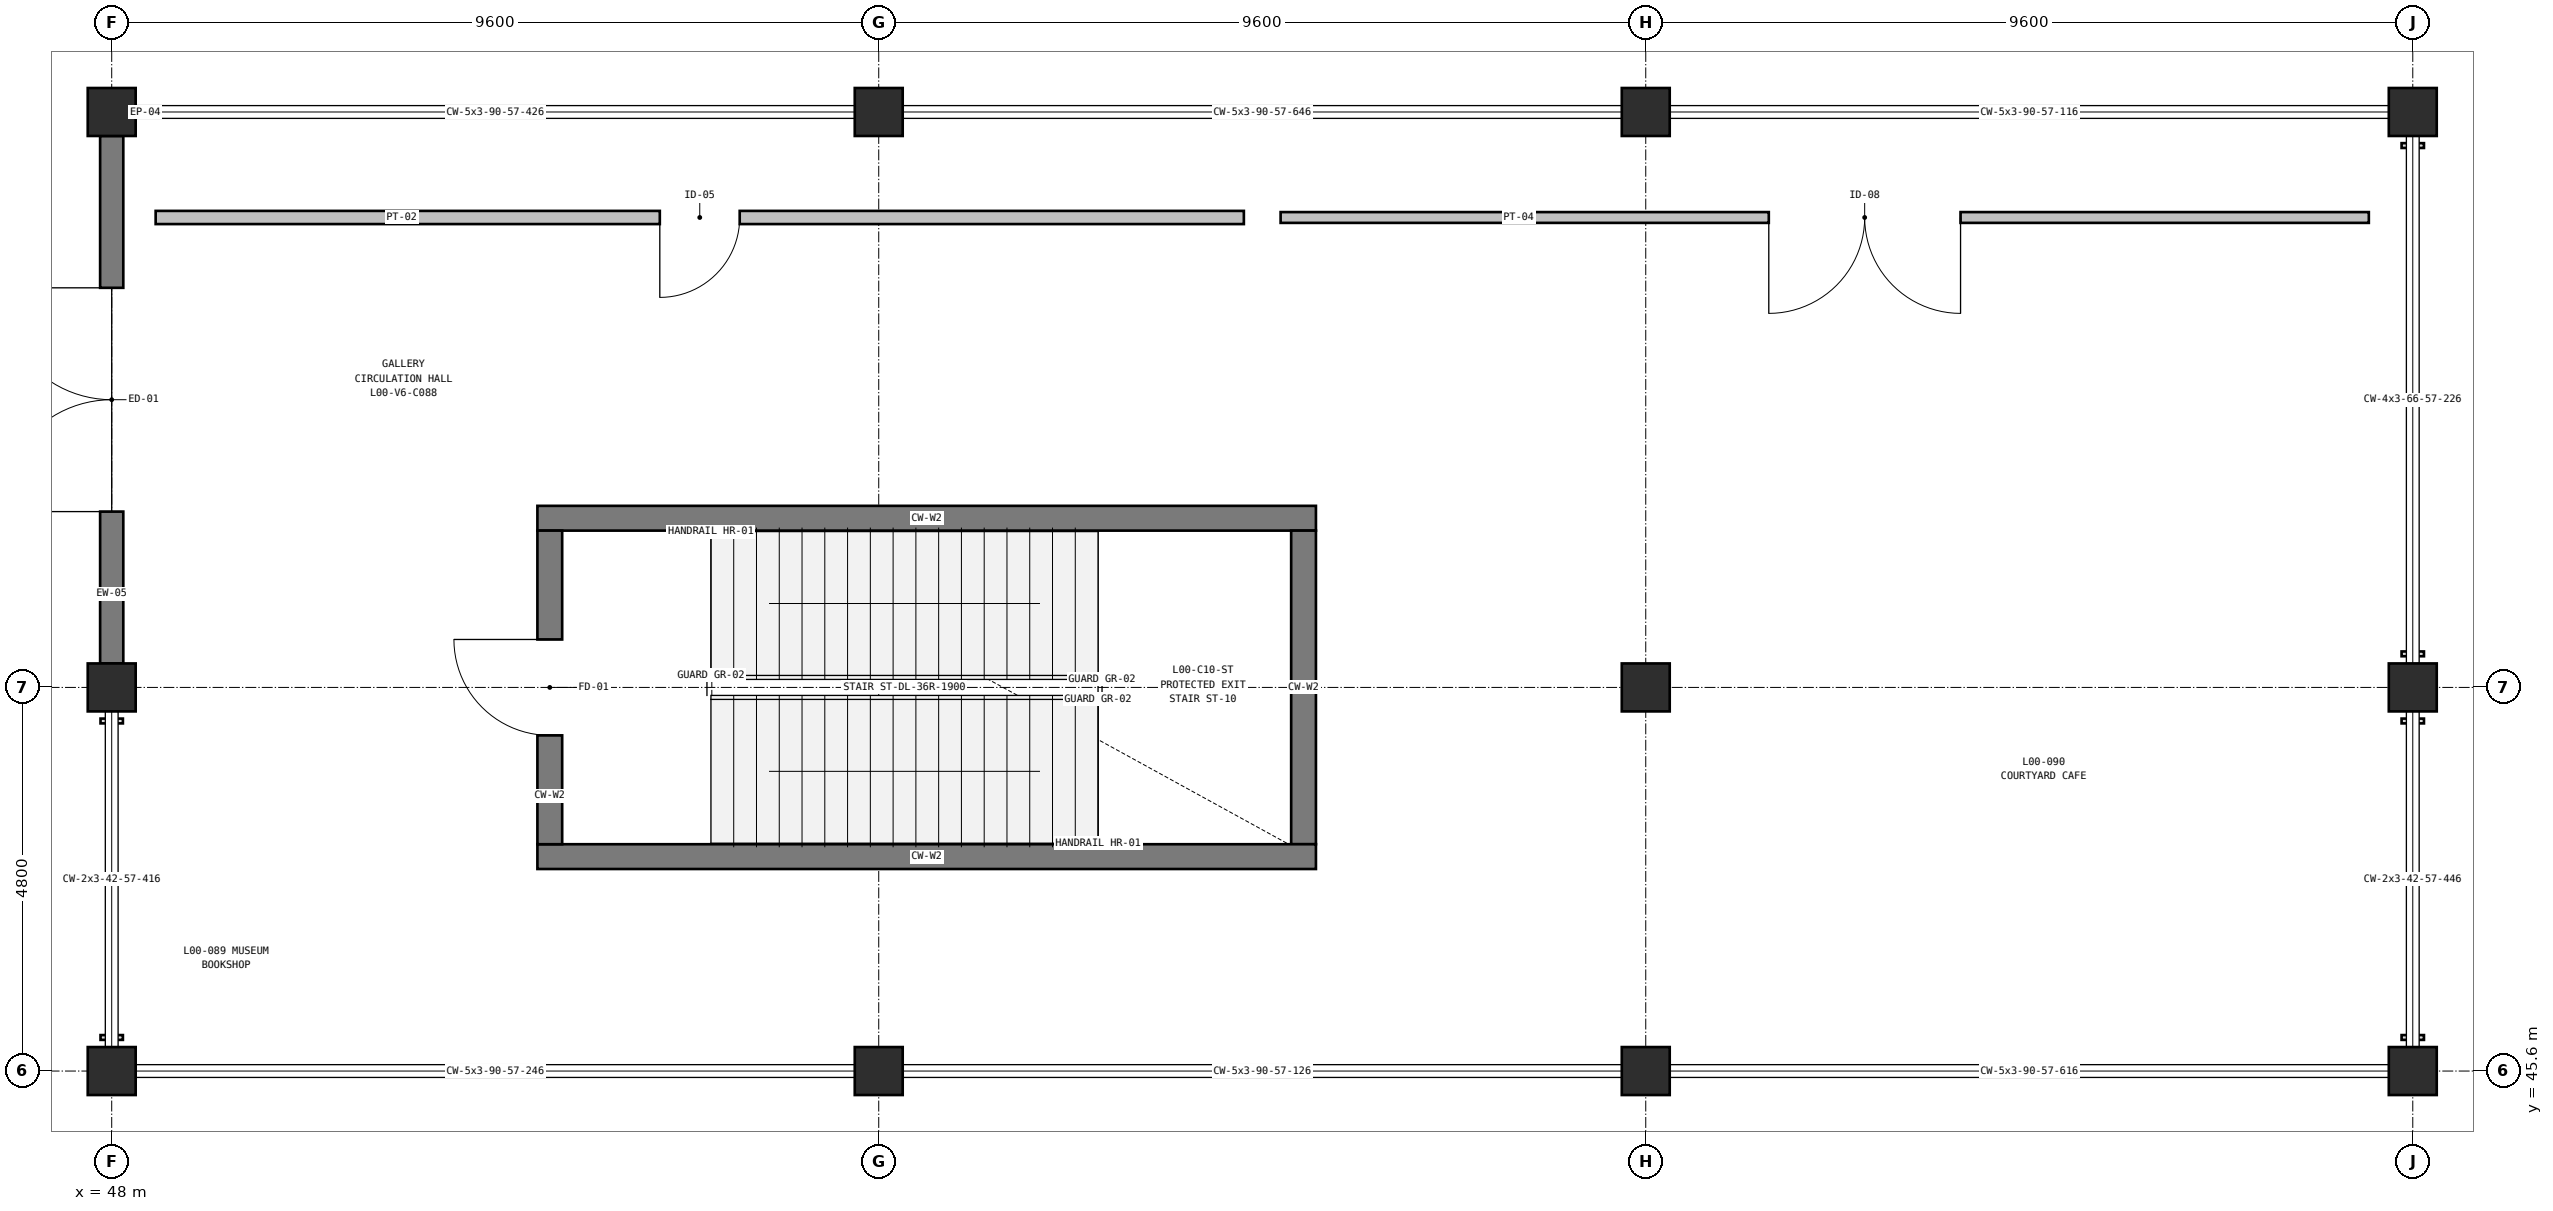
"""IFC4 building model, lengths in metres.
Left out: names, types, materials, properties, quantities, classifications, styles, units other than length and angle.
Written with IfcOpenShell. Run it as: python <this file> out.ifc"""

import sys

from ifc_helpers import new_model, si_unit, direction, frame, frame_2d, origin, origin_2d, place, context, subcontext, project, spatial, rectangle, extrude, element, fill, save


model = new_model("IFC4")
c1 = context("Model", 3, precision=1e-05, world=origin(), true_north=direction((0.0, 1.0)))
c2 = subcontext(c1, "Body", "Model", "MODEL_VIEW")
j1 = project(units=[si_unit("LENGTHUNIT", "METRE"), si_unit("PLANEANGLEUNIT", "RADIAN")], contexts=[c1])
p1 = place(None, origin())
s1 = spatial("IfcSite", under=j1, at=p1, CompositionType="ELEMENT")
p2 = place(p1, origin())
s2 = spatial("IfcBuilding", under=s1, at=p2, CompositionType="ELEMENT")
p3 = place(p2, origin())
s3 = spatial("IfcBuildingStorey", under=s2, at=p3, CompositionType="ELEMENT", Elevation=0.0)
for number, where, z_axis, x_axis in (
    (1, (48.0, 45.6, 0.0), (0.0, 0.0, 1.0), (1.0, 0.0, 0.0)),
    (2, (48.0, 50.4, 0.0), (0.0, 0.0, 1.0), (1.0, 0.0, 0.0)),
    (3, (48.0, 57.6, 0.0), (0.0, 0.0, 1.0), (1.0, 0.0, 0.0)),
    (4, (57.6, 45.6, 0.0), (0.0, 0.0, 1.0), (1.0, 0.0, 0.0)),
    (5, (57.6, 57.6, 0.0), (0.0, 0.0, 1.0), (1.0, 0.0, 0.0)),
    (6, (67.2, 45.6, 0.0), (0.0, 0.0, 1.0), (1.0, 0.0, 0.0)),
    (7, (67.2, 50.4, 0.0), (0.0, 0.0, 1.0), (1.0, 0.0, 0.0)),
    (8, (67.2, 57.6, 0.0), (0.0, 0.0, 1.0), (1.0, 0.0, 0.0)),
    (9, (76.8, 45.6, 0.0), (0.0, 0.0, 1.0), (1.0, 0.0, 0.0)),
    (10, (76.8, 50.4, 0.0), (0.0, 0.0, 1.0), (1.0, 0.0, 0.0)),
    (11, (76.8, 57.6, 0.0), (0.0, 0.0, 1.0), (1.0, 0.0, 0.0)),
):
    element("IfcColumn", number, at=place(p3, frame(where, z_axis=z_axis, x_axis=x_axis)), inside=s3, PredefinedType="COLUMN", context=c2, shape_type="SweptSolid", body=[
        extrude(rectangle(XDim=0.6, YDim=0.6, at=origin_2d()), origin(), (0.0, 0.0, 1.0), 6.0),
    ])
p4 = place(p3, frame((48.0, 50.7, 0.0), z_axis=(0.0, 0.0, 1.0), x_axis=(0.0, 1.0, 0.0)))
e12 = element("IfcWall", 12, at=p4, inside=s3, PredefinedType="SOLIDWALL", context=c2, shape_type="SweptSolid", body=[
    extrude(rectangle(XDim=6.6, YDim=0.29, at=frame_2d((3.3, 0.0))), origin(), (0.0, 0.0, 1.0), 5.68),
])
p5 = place(p4, frame((1.9, 0.0, 0.0)))
e13 = element("IfcOpeningElement", 13, at=p5, cuts=e12, PredefinedType="OPENING", context=c2, shape_type="SweptSolid", body=[
    extrude(rectangle(XDim=2.8, YDim=2.5, at=frame_2d((1.4, 1.25))), frame((0.0, 0.155, 0.0), z_axis=(0.0, -1.0, 0.0), x_axis=(1.0, 0.0, 0.0)), (0.0, 0.0, 1.0), 0.31),
])
p6 = place(p3, frame((53.328, 52.517, 0.0), z_axis=(0.0, 0.0, 1.0), x_axis=(1.0, 0.0, 0.0)))
e14 = element("IfcWall", 14, at=p6, inside=s3, PredefinedType="SHEAR", context=c2, shape_type="SweptSolid", body=[
    extrude(rectangle(XDim=9.744, YDim=0.31, at=frame_2d((4.872, 0.0))), origin(), (0.0, 0.0, 1.0), 5.68),
])
p7 = place(p3, frame((62.917, 52.362, 0.0), z_axis=(0.0, 0.0, 1.0), x_axis=(0.0, -1.0, 0.0)))
e15 = element("IfcWall", 15, at=p7, inside=s3, PredefinedType="SHEAR", context=c2, shape_type="SweptSolid", body=[
    extrude(rectangle(XDim=3.924, YDim=0.31, at=frame_2d((1.962, 0.0))), origin(), (0.0, 0.0, 1.0), 5.68),
])
p8 = place(p3, frame((63.072, 48.283, 0.0), z_axis=(0.0, 0.0, 1.0), x_axis=(-1.0, 0.0, 0.0)))
e16 = element("IfcWall", 16, at=p8, inside=s3, PredefinedType="SHEAR", context=c2, shape_type="SweptSolid", body=[
    extrude(rectangle(XDim=9.744, YDim=0.31, at=frame_2d((4.872, 0.0))), origin(), (0.0, 0.0, 1.0), 5.68),
])
p9 = place(p3, frame((53.483, 48.438, 0.0), z_axis=(0.0, 0.0, 1.0), x_axis=(0.0, 1.0, 0.0)))
e17 = element("IfcWall", 17, at=p9, inside=s3, PredefinedType="SHEAR", context=c2, shape_type="SweptSolid", body=[
    extrude(rectangle(XDim=3.924, YDim=0.31, at=frame_2d((1.962, 0.0))), origin(), (0.0, 0.0, 1.0), 5.68),
])
p10 = place(p9, frame((1.362, 0.0, 0.0)))
e18 = element("IfcOpeningElement", 18, at=p10, cuts=e17, PredefinedType="OPENING", context=c2, shape_type="SweptSolid", body=[
    extrude(rectangle(XDim=1.2, YDim=2.2, at=frame_2d((0.6, 1.1))), frame((0.0, 0.165, 0.0), z_axis=(0.0, -1.0, 0.0), x_axis=(1.0, 0.0, 0.0)), (0.0, 0.0, 1.0), 0.33),
])
p11 = place(p3, frame((62.17, 56.28, 0.0), z_axis=(0.0, 0.0, 1.0), x_axis=(-1.0, 0.0, 0.0)))
e19 = element("IfcWall", 19, at=p11, inside=s3, PredefinedType="PARTITIONING", context=c2, shape_type="SweptSolid", body=[
    extrude(rectangle(XDim=13.62, YDim=0.165, at=frame_2d((6.81, 0.0))), origin(), (0.0, 0.0, 1.0), 5.68),
])
p12 = place(p11, frame((6.31, 0.0, 0.0)))
e20 = element("IfcOpeningElement", 20, at=p12, cuts=e19, PredefinedType="OPENING", context=c2, shape_type="SweptSolid", body=[
    extrude(rectangle(XDim=1.0, YDim=2.15, at=frame_2d((0.5, 1.075))), frame((0.0, 0.093, 0.0), z_axis=(0.0, -1.0, 0.0), x_axis=(1.0, 0.0, 0.0)), (0.0, 0.0, 1.0), 0.185),
])
p13 = place(p3, frame((76.25, 56.28, 0.0), z_axis=(0.0, 0.0, 1.0), x_axis=(-1.0, 0.0, 0.0)))
e21 = element("IfcWall", 21, at=p13, inside=s3, PredefinedType="PARTITIONING", context=c2, shape_type="SweptSolid", body=[
    extrude(rectangle(XDim=13.62, YDim=0.135, at=frame_2d((6.81, 0.0))), origin(), (0.0, 0.0, 1.0), 4.955),
])
p14 = place(p13, frame((5.11, 0.0, 0.0)))
e22 = element("IfcOpeningElement", 22, at=p14, cuts=e21, PredefinedType="OPENING", context=c2, shape_type="SweptSolid", body=[
    extrude(rectangle(XDim=2.4, YDim=2.6, at=frame_2d((1.2, 1.3))), frame((0.0, 0.077, 0.0), z_axis=(0.0, -1.0, 0.0), x_axis=(1.0, 0.0, 0.0)), (0.0, 0.0, 1.0), 0.155),
])
p15 = place(p5, origin())
e23 = element("IfcDoor", 23, at=p15, inside=s3, OperationType="DOUBLE_DOOR_SINGLE_SWING", PredefinedType="DOOR", context=c2, shape_type="SweptSolid", body=[
    extrude(rectangle(XDim=2.8, YDim=2.5, at=frame_2d((1.4, 1.25))), frame((0.0, 0.025, 0.0), z_axis=(0.0, -1.0, 0.0), x_axis=(1.0, 0.0, 0.0)), (0.0, 0.0, 1.0), 0.05),
])
fill(e13, e23)
p16 = place(p10, origin())
e24 = element("IfcDoor", 24, at=p16, inside=s3, OperationType="SINGLE_SWING_RIGHT", PredefinedType="DOOR", context=c2, shape_type="SweptSolid", body=[
    extrude(rectangle(XDim=1.2, YDim=2.2, at=frame_2d((0.6, 1.1))), frame((0.0, 0.025, 0.0), z_axis=(0.0, -1.0, 0.0), x_axis=(1.0, 0.0, 0.0)), (0.0, 0.0, 1.0), 0.05),
])
fill(e18, e24)
p17 = place(p12, origin())
e25 = element("IfcDoor", 25, at=p17, inside=s3, OperationType="SINGLE_SWING_RIGHT", PredefinedType="DOOR", context=c2, shape_type="SweptSolid", body=[
    extrude(rectangle(XDim=1.0, YDim=2.15, at=frame_2d((0.5, 1.075))), frame((0.0, 0.025, 0.0), z_axis=(0.0, -1.0, 0.0), x_axis=(1.0, 0.0, 0.0)), (0.0, 0.0, 1.0), 0.05),
])
fill(e20, e25)
p18 = place(p14, origin())
e26 = element("IfcDoor", 26, at=p18, inside=s3, OperationType="DOUBLE_DOOR_SINGLE_SWING", PredefinedType="DOOR", context=c2, shape_type="SweptSolid", body=[
    extrude(rectangle(XDim=2.4, YDim=2.6, at=frame_2d((1.2, 1.3))), frame((0.0, 0.025, 0.0), z_axis=(0.0, -1.0, 0.0), x_axis=(1.0, 0.0, 0.0)), (0.0, 0.0, 1.0), 0.05),
])
fill(e22, e26)
save(model, sys.argv[1])
